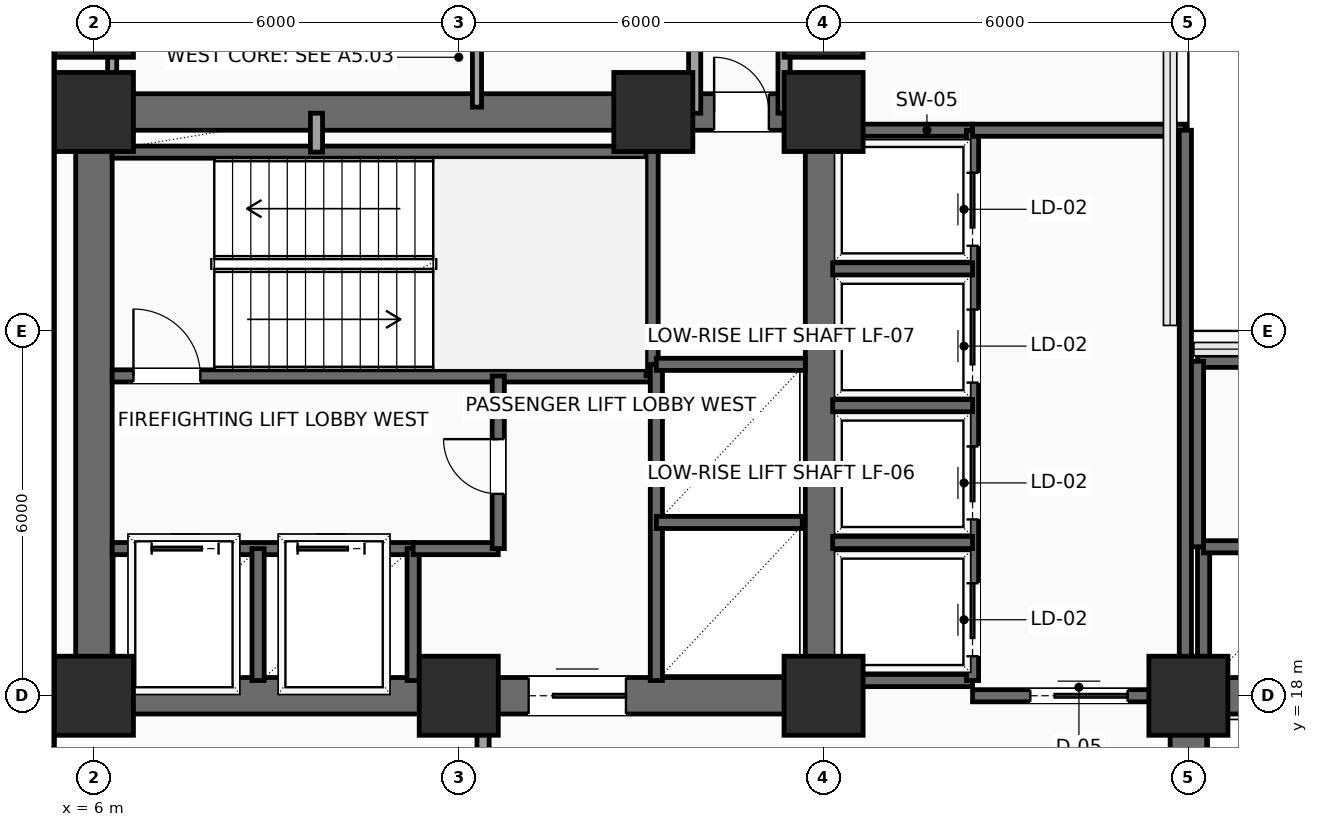
"""IFC4 building model, lengths in metres.
Left out: names, types, materials, properties, quantities, classifications, styles, units other than length and angle.
Written with IfcOpenShell. Run it as: python <this file> out.ifc"""

import sys

from ifc_helpers import new_model, si_unit, direction, frame, frame_2d, origin, origin_2d, place, context, subcontext, project, spatial, rectangle, extrude, element, fill, save


model = new_model("IFC4")
c1 = context("Model", 3, precision=1e-05, world=origin(), true_north=direction((0.0, 1.0)))
c2 = subcontext(c1, "Body", "Model", "MODEL_VIEW")
j1 = project(units=[si_unit("LENGTHUNIT", "METRE"), si_unit("PLANEANGLEUNIT", "RADIAN")], contexts=[c1])
p1 = place(None, origin())
s1 = spatial("IfcSite", under=j1, at=p1, CompositionType="ELEMENT")
p2 = place(p1, origin())
s2 = spatial("IfcBuilding", under=s1, at=p2, CompositionType="ELEMENT")
p3 = place(p2, frame((0.0, 0.0, 44.1)))
s3 = spatial("IfcBuildingStorey", under=s2, at=p3, CompositionType="ELEMENT", Elevation=44.1)
for number, where, z_axis, x_axis in (
    (1, (6.0, 18.0, 0.0), (0.0, 0.0, 1.0), (1.0, 0.0, 0.0)),
    (2, (12.0, 18.0, 0.0), (0.0, 0.0, 1.0), (1.0, 0.0, 0.0)),
    (3, (18.0, 18.0, 0.0), (0.0, 0.0, 1.0), (1.0, 0.0, 0.0)),
    (4, (6.0, 27.6, 0.0), (0.0, 0.0, 1.0), (1.0, 0.0, 0.0)),
    (5, (15.2, 27.6, 0.0), (0.0, 0.0, 1.0), (1.0, 0.0, 0.0)),
    (6, (18.0, 27.6, 0.0), (0.0, 0.0, 1.0), (1.0, 0.0, 0.0)),
    (7, (24.0, 18.0, 0.0), (0.0, 0.0, 1.0), (1.0, 0.0, 0.0)),
    (8, (6.0, 29.15, 0.0), (0.0, 0.0, 1.0), (1.0, 0.0, 0.0)),
    (9, (18.0, 29.15, 0.0), (0.0, 0.0, 1.0), (1.0, 0.0, 0.0)),
):
    element("IfcColumn", number, at=place(p3, frame(where, z_axis=z_axis, x_axis=x_axis)), inside=s3, PredefinedType="COLUMN", context=c2, shape_type="SweptSolid", body=[
        extrude(rectangle(XDim=1.3, YDim=1.3, at=origin_2d()), origin(), (0.0, 0.0, 1.0), 3.9),
    ])
p4 = place(p3, frame((6.0, 18.0, 0.0), z_axis=(0.0, 0.0, 1.0), x_axis=(1.0, 0.0, 0.0)))
e10 = element("IfcWall", 10, at=p4, inside=s3, PredefinedType="SHEAR", context=c2, shape_type="SweptSolid", body=[
    extrude(rectangle(XDim=12.0, YDim=0.6, at=frame_2d((6.0, 0.0))), origin(), (0.0, 0.0, 1.0), 3.65),
])
p5 = place(p4, frame((7.15, 0.0, 0.0)))
e11 = element("IfcOpeningElement", 11, at=p5, cuts=e10, PredefinedType="OPENING", context=c2, shape_type="SweptSolid", body=[
    extrude(rectangle(XDim=1.6, YDim=2.3, at=frame_2d((0.8, 1.15))), frame((0.0, 0.31, 0.0), z_axis=(0.0, -1.0, 0.0), x_axis=(1.0, 0.0, 0.0)), (0.0, 0.0, 1.0), 0.62),
])
p6 = place(p3, frame((6.0, 27.6, 0.0), z_axis=(0.0, 0.0, 1.0), x_axis=(1.0, 0.0, 0.0)))
e12 = element("IfcWall", 12, at=p6, inside=s3, PredefinedType="SHEAR", context=c2, shape_type="SweptSolid", body=[
    extrude(rectangle(XDim=12.0, YDim=0.6, at=frame_2d((6.0, 0.0))), origin(), (0.0, 0.0, 1.0), 3.65),
])
p7 = place(p6, frame((10.2, 0.0, 0.0)))
e13 = element("IfcOpeningElement", 13, at=p7, cuts=e12, PredefinedType="OPENING", context=c2, shape_type="SweptSolid", body=[
    extrude(rectangle(XDim=0.9, YDim=2.15, at=frame_2d((0.45, 1.075))), frame((0.0, 0.31, 0.0), z_axis=(0.0, -1.0, 0.0), x_axis=(1.0, 0.0, 0.0)), (0.0, 0.0, 1.0), 0.62),
])
for number, where, z_axis, x_axis in (
    (14, (6.0, 18.0, 0.0), (0.0, 0.0, 1.0), (0.0, 1.0, 0.0)),
    (15, (18.0, 18.0, 0.0), (0.0, 0.0, 1.0), (0.0, 1.0, 0.0)),
    (16, (24.0, 18.0, 0.0), (0.0, 0.0, 1.0), (1.0, 0.0, 0.0)),
):
    element("IfcWall", number, at=place(p3, frame(where, z_axis=z_axis, x_axis=x_axis)), inside=s3, PredefinedType="SHEAR", context=c2, shape_type="SweptSolid", body=[
        extrude(rectangle(XDim=9.6, YDim=0.6, at=frame_2d((4.8, 0.0))), origin(), (0.0, 0.0, 1.0), 3.65),
    ])
p8 = place(p3, frame((24.0, 6.0, 0.0), z_axis=(0.0, 0.0, 1.0), x_axis=(0.0, 1.0, 0.0)))
e17 = element("IfcWall", 17, at=p8, inside=s3, PredefinedType="SHEAR", context=c2, shape_type="SweptSolid", body=[
    extrude(rectangle(XDim=12.0, YDim=0.6, at=frame_2d((6.0, 0.0))), origin(), (0.0, 0.0, 1.0), 3.65),
])
p9 = place(p8, frame((7.15, 0.0, 0.0)))
e18 = element("IfcOpeningElement", 18, at=p9, cuts=e17, PredefinedType="OPENING", context=c2, shape_type="SweptSolid", body=[
    extrude(rectangle(XDim=1.6, YDim=2.3, at=frame_2d((0.8, 1.15))), frame((0.0, 0.31, 0.0), z_axis=(0.0, -1.0, 0.0), x_axis=(1.0, 0.0, 0.0)), (0.0, 0.0, 1.0), 0.62),
])
p10 = place(p3, frame((6.3, 23.26, 0.0), z_axis=(0.0, 0.0, 1.0), x_axis=(1.0, 0.0, 0.0)))
e19 = element("IfcWall", 19, at=p10, inside=s3, PredefinedType="SHEAR", context=c2, shape_type="SweptSolid", body=[
    extrude(rectangle(XDim=8.88, YDim=0.2, at=frame_2d((4.44, 0.0))), origin(), (0.0, 0.0, 1.0), 3.65),
])
p11 = place(p10, frame((0.35, 0.0, 0.0)))
e20 = element("IfcOpeningElement", 20, at=p11, cuts=e19, PredefinedType="OPENING", context=c2, shape_type="SweptSolid", body=[
    extrude(rectangle(XDim=1.1, YDim=2.2, at=frame_2d((0.55, 1.1))), frame((0.0, 0.11, 0.0), z_axis=(0.0, -1.0, 0.0), x_axis=(1.0, 0.0, 0.0)), (0.0, 0.0, 1.0), 0.22),
])
p12 = place(p3, frame((6.3, 26.94, 0.0), z_axis=(0.0, 0.0, 1.0), x_axis=(1.0, 0.0, 0.0)))
e21 = element("IfcWall", 21, at=p12, inside=s3, PredefinedType="SHEAR", context=c2, shape_type="SweptSolid", body=[
    extrude(rectangle(XDim=8.88, YDim=0.2, at=frame_2d((4.44, 0.0))), origin(), (0.0, 0.0, 1.0), 3.65),
])
p13 = place(p3, frame((15.18, 23.26, 0.0), z_axis=(0.0, 0.0, 1.0), x_axis=(0.0, 1.0, 0.0)))
e22 = element("IfcWall", 22, at=p13, inside=s3, PredefinedType="SHEAR", context=c2, shape_type="SweptSolid", body=[
    extrude(rectangle(XDim=4.04, YDim=0.2, at=frame_2d((2.02, 0.0))), origin(), (0.0, 0.0, 1.0), 3.65),
])
p14 = place(p3, frame((6.3, 20.42, 0.0), z_axis=(0.0, 0.0, 1.0), x_axis=(1.0, 0.0, 0.0)))
e23 = element("IfcWall", 23, at=p14, inside=s3, PredefinedType="SHEAR", context=c2, shape_type="SweptSolid", body=[
    extrude(rectangle(XDim=4.95, YDim=0.2, at=frame_2d((2.475, 0.0))), origin(), (0.0, 0.0, 1.0), 3.65),
])
p15 = place(p14, frame((0.65, 0.0, 0.0)))
e24 = element("IfcOpeningElement", 24, at=p15, cuts=e23, PredefinedType="OPENING", context=c2, shape_type="SweptSolid", body=[
    extrude(rectangle(XDim=1.1, YDim=2.2, at=frame_2d((0.55, 1.1))), frame((0.0, 0.11, 0.0), z_axis=(0.0, -1.0, 0.0), x_axis=(1.0, 0.0, 0.0)), (0.0, 0.0, 1.0), 0.22),
])
p16 = place(p14, frame((3.05, 0.0, 0.0)))
e25 = element("IfcOpeningElement", 25, at=p16, cuts=e23, PredefinedType="OPENING", context=c2, shape_type="SweptSolid", body=[
    extrude(rectangle(XDim=1.1, YDim=2.2, at=frame_2d((0.55, 1.1))), frame((0.0, 0.11, 0.0), z_axis=(0.0, -1.0, 0.0), x_axis=(1.0, 0.0, 0.0)), (0.0, 0.0, 1.0), 0.22),
])
for number, where, z_axis, x_axis in (
    (26, (8.7, 18.25, 0.0), (0.0, 0.0, 1.0), (0.0, 1.0, 0.0)),
    (27, (11.25, 18.25, 0.0), (0.0, 0.0, 1.0), (0.0, 1.0, 0.0)),
):
    element("IfcWall", number, at=place(p3, frame(where, z_axis=z_axis, x_axis=x_axis)), inside=s3, PredefinedType="SHEAR", context=c2, shape_type="SweptSolid", body=[
        extrude(rectangle(XDim=2.17, YDim=0.2, at=frame_2d((1.085, 0.0))), origin(), (0.0, 0.0, 1.0), 3.65),
    ])
p17 = place(p3, frame((11.25, 20.42, 0.0), z_axis=(0.0, 0.0, 1.0), x_axis=(1.0, 0.0, 0.0)))
e28 = element("IfcWall", 28, at=p17, inside=s3, PredefinedType="SHEAR", context=c2, shape_type="SweptSolid", body=[
    extrude(rectangle(XDim=1.4, YDim=0.2, at=frame_2d((0.7, 0.0))), origin(), (0.0, 0.0, 1.0), 3.65),
])
p18 = place(p3, frame((12.65, 20.42, 0.0), z_axis=(0.0, 0.0, 1.0), x_axis=(0.0, 1.0, 0.0)))
e29 = element("IfcWall", 29, at=p18, inside=s3, PredefinedType="SHEAR", context=c2, shape_type="SweptSolid", body=[
    extrude(rectangle(XDim=2.84, YDim=0.2, at=frame_2d((1.42, 0.0))), origin(), (0.0, 0.0, 1.0), 3.65),
])
p19 = place(p18, frame((0.9, 0.0, 0.0)))
e30 = element("IfcOpeningElement", 30, at=p19, cuts=e29, PredefinedType="OPENING", context=c2, shape_type="SweptSolid", body=[
    extrude(rectangle(XDim=0.9, YDim=2.15, at=frame_2d((0.45, 1.075))), frame((0.0, 0.11, 0.0), z_axis=(0.0, -1.0, 0.0), x_axis=(1.0, 0.0, 0.0)), (0.0, 0.0, 1.0), 0.22),
])
p20 = place(p3, frame((9.66, 26.94, 0.0), z_axis=(0.0, 0.0, 1.0), x_axis=(0.0, 1.0, 0.0)))
e31 = element("IfcWall", 31, at=p20, inside=s3, PredefinedType="SOLIDWALL", context=c2, shape_type="SweptSolid", body=[
    extrude(rectangle(XDim=0.64, YDim=0.2, at=frame_2d((0.32, 0.0))), origin(), (0.0, 0.0, 1.0), 3.65),
])
p21 = place(p3, frame((15.25, 18.25, 0.0), z_axis=(0.0, 0.0, 1.0), x_axis=(0.0, 1.0, 0.0)))
e32 = element("IfcWall", 32, at=p21, inside=s3, PredefinedType="SHEAR", context=c2, shape_type="SweptSolid", body=[
    extrude(rectangle(XDim=5.2, YDim=0.2, at=frame_2d((2.6, 0.0))), origin(), (0.0, 0.0, 1.0), 3.65),
])
p22 = place(p3, frame((15.25, 20.85, 0.0), z_axis=(0.0, 0.0, 1.0), x_axis=(1.0, 0.0, 0.0)))
e33 = element("IfcWall", 33, at=p22, inside=s3, PredefinedType="SHEAR", context=c2, shape_type="SweptSolid", body=[
    extrude(rectangle(XDim=2.4, YDim=0.2, at=frame_2d((1.2, 0.0))), origin(), (0.0, 0.0, 1.0), 3.65),
])
p23 = place(p3, frame((15.25, 23.45, 0.0), z_axis=(0.0, 0.0, 1.0), x_axis=(1.0, 0.0, 0.0)))
e34 = element("IfcWall", 34, at=p23, inside=s3, PredefinedType="SHEAR", context=c2, shape_type="SweptSolid", body=[
    extrude(rectangle(XDim=2.45, YDim=0.2, at=frame_2d((1.225, 0.0))), origin(), (0.0, 0.0, 1.0), 3.65),
])
for number, where, z_axis, x_axis in (
    (35, (18.1, 27.3, 0.0), (0.0, 0.0, 1.0), (1.0, 0.0, 0.0)),
    (36, (18.1, 18.25, 0.0), (0.0, 0.0, 1.0), (1.0, 0.0, 0.0)),
):
    element("IfcWall", number, at=place(p3, frame(where, z_axis=z_axis, x_axis=x_axis)), inside=s3, PredefinedType="SHEAR", context=c2, shape_type="SweptSolid", body=[
        extrude(rectangle(XDim=2.35, YDim=0.2, at=frame_2d((1.175, 0.0))), origin(), (0.0, 0.0, 1.0), 3.65),
    ])
p24 = place(p3, frame((20.45, 18.25, 0.0), z_axis=(0.0, 0.0, 1.0), x_axis=(0.0, 1.0, 0.0)))
e37 = element("IfcWall", 37, at=p24, inside=s3, PredefinedType="SHEAR", context=c2, shape_type="SweptSolid", body=[
    extrude(rectangle(XDim=9.05, YDim=0.2, at=frame_2d((4.525, 0.0))), origin(), (0.0, 0.0, 1.0), 3.65),
])
p25 = place(p24, frame((0.4, 0.0, 0.0)))
e38 = element("IfcOpeningElement", 38, at=p25, cuts=e37, PredefinedType="OPENING", context=c2, shape_type="SweptSolid", body=[
    extrude(rectangle(XDim=1.2, YDim=2.2, at=frame_2d((0.6, 1.1))), frame((0.0, 0.11, 0.0), z_axis=(0.0, -1.0, 0.0), x_axis=(1.0, 0.0, 0.0)), (0.0, 0.0, 1.0), 0.22),
])
p26 = place(p24, frame((2.65, 0.0, 0.0)))
e39 = element("IfcOpeningElement", 39, at=p26, cuts=e37, PredefinedType="OPENING", context=c2, shape_type="SweptSolid", body=[
    extrude(rectangle(XDim=1.2, YDim=2.2, at=frame_2d((0.6, 1.1))), frame((0.0, 0.11, 0.0), z_axis=(0.0, -1.0, 0.0), x_axis=(1.0, 0.0, 0.0)), (0.0, 0.0, 1.0), 0.22),
])
p27 = place(p24, frame((4.9, 0.0, 0.0)))
e40 = element("IfcOpeningElement", 40, at=p27, cuts=e37, PredefinedType="OPENING", context=c2, shape_type="SweptSolid", body=[
    extrude(rectangle(XDim=1.2, YDim=2.2, at=frame_2d((0.6, 1.1))), frame((0.0, 0.11, 0.0), z_axis=(0.0, -1.0, 0.0), x_axis=(1.0, 0.0, 0.0)), (0.0, 0.0, 1.0), 0.22),
])
p28 = place(p24, frame((7.15, 0.0, 0.0)))
e41 = element("IfcOpeningElement", 41, at=p28, cuts=e37, PredefinedType="OPENING", context=c2, shape_type="SweptSolid", body=[
    extrude(rectangle(XDim=1.2, YDim=2.2, at=frame_2d((0.6, 1.1))), frame((0.0, 0.11, 0.0), z_axis=(0.0, -1.0, 0.0), x_axis=(1.0, 0.0, 0.0)), (0.0, 0.0, 1.0), 0.22),
])
for number, where, z_axis, x_axis in (
    (42, (18.15, 20.52, 0.0), (0.0, 0.0, 1.0), (1.0, 0.0, 0.0)),
    (43, (18.15, 22.77, 0.0), (0.0, 0.0, 1.0), (1.0, 0.0, 0.0)),
    (44, (18.15, 25.02, 0.0), (0.0, 0.0, 1.0), (1.0, 0.0, 0.0)),
):
    element("IfcWall", number, at=place(p3, frame(where, z_axis=z_axis, x_axis=x_axis)), inside=s3, PredefinedType="SHEAR", context=c2, shape_type="SweptSolid", body=[
        extrude(rectangle(XDim=2.3, YDim=0.2, at=frame_2d((1.15, 0.0))), origin(), (0.0, 0.0, 1.0), 3.65),
    ])
p29 = place(p3, frame((20.45, 18.0, 0.0), z_axis=(0.0, 0.0, 1.0), x_axis=(1.0, 0.0, 0.0)))
e45 = element("IfcWall", 45, at=p29, inside=s3, PredefinedType="SHEAR", context=c2, shape_type="SweptSolid", body=[
    extrude(rectangle(XDim=3.5, YDim=0.2, at=frame_2d((1.75, 0.0))), origin(), (0.0, 0.0, 1.0), 3.65),
])
p30 = place(p29, frame((0.95, 0.0, 0.0)))
e46 = element("IfcOpeningElement", 46, at=p30, cuts=e45, PredefinedType="OPENING", context=c2, shape_type="SweptSolid", body=[
    extrude(rectangle(XDim=1.6, YDim=2.3, at=frame_2d((0.8, 1.15))), frame((0.0, 0.11, 0.0), z_axis=(0.0, -1.0, 0.0), x_axis=(1.0, 0.0, 0.0)), (0.0, 0.0, 1.0), 0.22),
])
p31 = place(p3, frame((20.45, 27.3, 0.0), z_axis=(0.0, 0.0, 1.0), x_axis=(1.0, 0.0, 0.0)))
e47 = element("IfcWall", 47, at=p31, inside=s3, PredefinedType="SHEAR", context=c2, shape_type="SweptSolid", body=[
    extrude(rectangle(XDim=3.5, YDim=0.2, at=frame_2d((1.75, 0.0))), origin(), (0.0, 0.0, 1.0), 3.65),
])
p32 = place(p3, frame((23.95, 18.0, 0.0), z_axis=(0.0, 0.0, 1.0), x_axis=(0.0, 1.0, 0.0)))
e48 = element("IfcWall", 48, at=p32, inside=s3, PredefinedType="SHEAR", context=c2, shape_type="SweptSolid", body=[
    extrude(rectangle(XDim=9.3, YDim=0.2, at=frame_2d((4.65, 0.0))), origin(), (0.0, 0.0, 1.0), 3.65),
])
p33 = place(p3, frame((24.25, 18.1, 0.0), z_axis=(0.0, 0.0, 1.0), x_axis=(0.0, 1.0, 0.0)))
e49 = element("IfcWall", 49, at=p33, inside=s3, PredefinedType="SHEAR", context=c2, shape_type="SweptSolid", body=[
    extrude(rectangle(XDim=2.35, YDim=0.2, at=frame_2d((1.175, 0.0))), origin(), (0.0, 0.0, 1.0), 3.65),
])
p34 = place(p3, frame((24.25, 20.45, 0.0), z_axis=(0.0, 0.0, 1.0), x_axis=(1.0, 0.0, 0.0)))
e50 = element("IfcWall", 50, at=p34, inside=s3, PredefinedType="SHEAR", context=c2, shape_type="SweptSolid", body=[
    extrude(rectangle(XDim=9.05, YDim=0.2, at=frame_2d((4.525, 0.0))), origin(), (0.0, 0.0, 1.0), 3.65),
])
p35 = place(p3, frame((24.15, 23.5, 0.0), z_axis=(0.0, 0.0, 1.0), x_axis=(1.0, 0.0, 0.0)))
e51 = element("IfcWall", 51, at=p35, inside=s3, PredefinedType="SHEAR", context=c2, shape_type="SweptSolid", body=[
    extrude(rectangle(XDim=9.15, YDim=0.2, at=frame_2d((4.575, 0.0))), origin(), (0.0, 0.0, 1.0), 3.65),
])
p36 = place(p3, frame((24.15, 20.45, 0.0), z_axis=(0.0, 0.0, 1.0), x_axis=(0.0, 1.0, 0.0)))
e52 = element("IfcWall", 52, at=p36, inside=s3, PredefinedType="SHEAR", context=c2, shape_type="SweptSolid", body=[
    extrude(rectangle(XDim=3.05, YDim=0.2, at=frame_2d((1.525, 0.0))), origin(), (0.0, 0.0, 1.0), 3.65),
])
for number, where, z_axis, x_axis in (
    (53, (17.35, 30.25, 0.0), (0.0, 0.0, 1.0), (0.0, -1.0, 0.0)),
    (54, (15.88, 27.58, 0.0), (0.0, 0.0, 1.0), (0.0, 1.0, 0.0)),
):
    element("IfcWall", number, at=place(p3, frame(where, z_axis=z_axis, x_axis=x_axis)), inside=s3, PredefinedType="PARTITIONING", context=c2, shape_type="SweptSolid", body=[
        extrude(rectangle(XDim=2.67, YDim=0.2, at=frame_2d((1.335, 0.0))), origin(), (0.0, 0.0, 1.0), 3.65),
    ])
p37 = place(p3, frame((5.25, 30.25, 0.0), z_axis=(0.0, 0.0, 1.0), x_axis=(0.0, -1.0, 0.0)))
e55 = element("IfcWall", 55, at=p37, inside=s3, PredefinedType="PARTITIONING", context=c2, shape_type="SweptSolid", body=[
    extrude(rectangle(XDim=13.35, YDim=0.2, at=frame_2d((6.675, 0.0))), origin(), (0.0, 0.0, 1.0), 3.65),
])
p38 = place(p3, frame((12.4, 16.9, 0.0), z_axis=(0.0, 0.0, 1.0), x_axis=(0.0, 1.0, 0.0)))
e56 = element("IfcWall", 56, at=p38, inside=s3, PredefinedType="PARTITIONING", context=c2, shape_type="SweptSolid", body=[
    extrude(rectangle(XDim=1.05, YDim=0.2, at=frame_2d((0.525, 0.0))), origin(), (0.0, 0.0, 1.0), 3.65),
])
for number, where, z_axis, x_axis in (
    (57, (6.3, 27.68, 0.0), (0.0, 0.0, 1.0), (0.0, 1.0, 0.0)),
    (58, (12.3, 27.68, 0.0), (0.0, 0.0, 1.0), (0.0, 1.0, 0.0)),
):
    element("IfcWall", number, at=place(p3, frame(where, z_axis=z_axis, x_axis=x_axis)), inside=s3, PredefinedType="PARTITIONING", context=c2, shape_type="SweptSolid", body=[
        extrude(rectangle(XDim=2.57, YDim=0.15, at=frame_2d((1.285, 0.0))), origin(), (0.0, 0.0, 1.0), 2.992),
    ])
p39 = place(p5, origin())
e59 = element("IfcDoor", 59, at=p39, inside=s3, OperationType="DOUBLE_DOOR_SLIDING", PredefinedType="DOOR", context=c2, shape_type="SweptSolid", body=[
    extrude(rectangle(XDim=1.6, YDim=2.3, at=frame_2d((0.8, 1.15))), frame((0.0, 0.025, 0.0), z_axis=(0.0, -1.0, 0.0), x_axis=(1.0, 0.0, 0.0)), (0.0, 0.0, 1.0), 0.05),
])
fill(e11, e59)
p40 = place(p7, origin())
e60 = element("IfcDoor", 60, at=p40, inside=s3, OperationType="SINGLE_SWING_LEFT", PredefinedType="DOOR", context=c2, shape_type="SweptSolid", body=[
    extrude(rectangle(XDim=0.9, YDim=2.15, at=frame_2d((0.45, 1.075))), frame((0.0, 0.025, 0.0), z_axis=(0.0, -1.0, 0.0), x_axis=(1.0, 0.0, 0.0)), (0.0, 0.0, 1.0), 0.05),
])
fill(e13, e60)
p41 = place(p11, origin())
e61 = element("IfcDoor", 61, at=p41, inside=s3, OperationType="SINGLE_SWING_LEFT", PredefinedType="DOOR", context=c2, shape_type="SweptSolid", body=[
    extrude(rectangle(XDim=1.1, YDim=2.2, at=frame_2d((0.55, 1.1))), frame((0.0, 0.025, 0.0), z_axis=(0.0, -1.0, 0.0), x_axis=(1.0, 0.0, 0.0)), (0.0, 0.0, 1.0), 0.05),
])
fill(e20, e61)
p42 = place(p15, origin())
e62 = element("IfcDoor", 62, at=p42, inside=s3, OperationType="SLIDING_TO_LEFT", PredefinedType="DOOR", context=c2, shape_type="SweptSolid", body=[
    extrude(rectangle(XDim=1.1, YDim=2.2, at=frame_2d((0.55, 1.1))), frame((0.0, 0.025, 0.0), z_axis=(0.0, -1.0, 0.0), x_axis=(1.0, 0.0, 0.0)), (0.0, 0.0, 1.0), 0.05),
])
fill(e24, e62)
p43 = place(p16, origin())
e63 = element("IfcDoor", 63, at=p43, inside=s3, OperationType="SLIDING_TO_LEFT", PredefinedType="DOOR", context=c2, shape_type="SweptSolid", body=[
    extrude(rectangle(XDim=1.1, YDim=2.2, at=frame_2d((0.55, 1.1))), frame((0.0, 0.025, 0.0), z_axis=(0.0, -1.0, 0.0), x_axis=(1.0, 0.0, 0.0)), (0.0, 0.0, 1.0), 0.05),
])
fill(e25, e63)
p44 = place(p19, origin())
e64 = element("IfcDoor", 64, at=p44, inside=s3, OperationType="SINGLE_SWING_RIGHT", PredefinedType="DOOR", context=c2, shape_type="SweptSolid", body=[
    extrude(rectangle(XDim=0.9, YDim=2.15, at=frame_2d((0.45, 1.075))), frame((0.0, 0.025, 0.0), z_axis=(0.0, -1.0, 0.0), x_axis=(1.0, 0.0, 0.0)), (0.0, 0.0, 1.0), 0.05),
])
fill(e30, e64)
p45 = place(p25, origin())
e65 = element("IfcDoor", 65, at=p45, inside=s3, OperationType="SLIDING_TO_RIGHT", PredefinedType="DOOR", context=c2, shape_type="SweptSolid", body=[
    extrude(rectangle(XDim=1.2, YDim=2.2, at=frame_2d((0.6, 1.1))), frame((0.0, 0.025, 0.0), z_axis=(0.0, -1.0, 0.0), x_axis=(1.0, 0.0, 0.0)), (0.0, 0.0, 1.0), 0.05),
])
fill(e38, e65)
p46 = place(p26, origin())
e66 = element("IfcDoor", 66, at=p46, inside=s3, OperationType="SLIDING_TO_RIGHT", PredefinedType="DOOR", context=c2, shape_type="SweptSolid", body=[
    extrude(rectangle(XDim=1.2, YDim=2.2, at=frame_2d((0.6, 1.1))), frame((0.0, 0.025, 0.0), z_axis=(0.0, -1.0, 0.0), x_axis=(1.0, 0.0, 0.0)), (0.0, 0.0, 1.0), 0.05),
])
fill(e39, e66)
p47 = place(p27, origin())
e67 = element("IfcDoor", 67, at=p47, inside=s3, OperationType="SLIDING_TO_RIGHT", PredefinedType="DOOR", context=c2, shape_type="SweptSolid", body=[
    extrude(rectangle(XDim=1.2, YDim=2.2, at=frame_2d((0.6, 1.1))), frame((0.0, 0.025, 0.0), z_axis=(0.0, -1.0, 0.0), x_axis=(1.0, 0.0, 0.0)), (0.0, 0.0, 1.0), 0.05),
])
fill(e40, e67)
p48 = place(p28, origin())
e68 = element("IfcDoor", 68, at=p48, inside=s3, OperationType="SLIDING_TO_RIGHT", PredefinedType="DOOR", context=c2, shape_type="SweptSolid", body=[
    extrude(rectangle(XDim=1.2, YDim=2.2, at=frame_2d((0.6, 1.1))), frame((0.0, 0.025, 0.0), z_axis=(0.0, -1.0, 0.0), x_axis=(1.0, 0.0, 0.0)), (0.0, 0.0, 1.0), 0.05),
])
fill(e41, e68)
p49 = place(p30, origin())
e69 = element("IfcDoor", 69, at=p49, inside=s3, OperationType="DOUBLE_DOOR_SLIDING", PredefinedType="DOOR", context=c2, shape_type="SweptSolid", body=[
    extrude(rectangle(XDim=1.6, YDim=2.3, at=frame_2d((0.8, 1.15))), frame((0.0, 0.025, 0.0), z_axis=(0.0, -1.0, 0.0), x_axis=(1.0, 0.0, 0.0)), (0.0, 0.0, 1.0), 0.05),
])
fill(e46, e69)
save(model, sys.argv[1])
